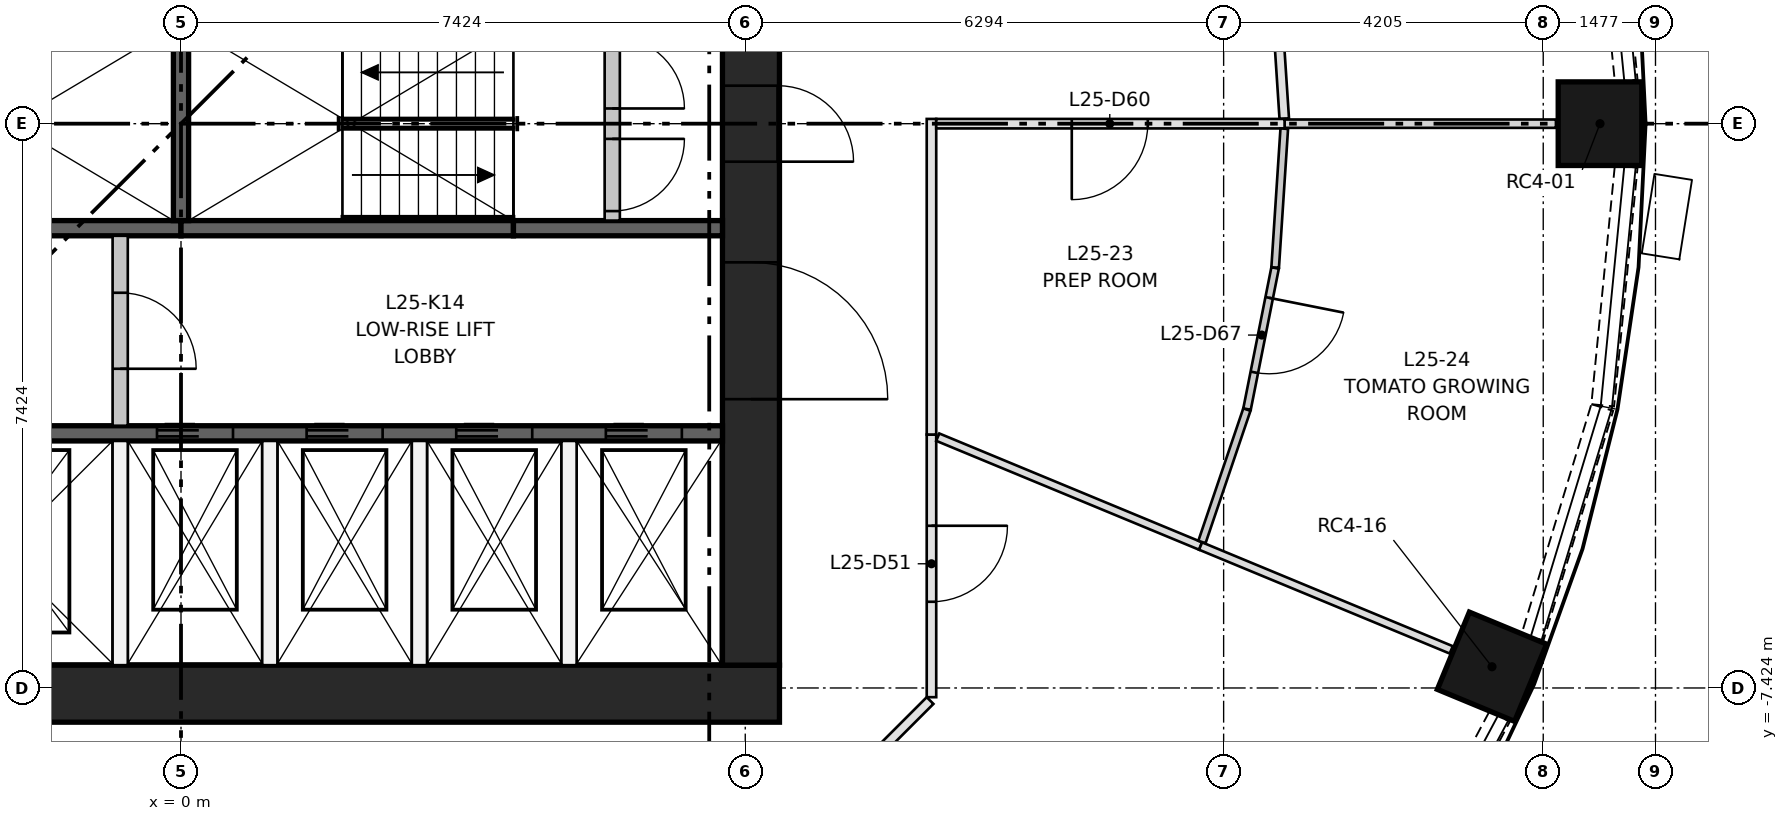
"""IFC4 building model, lengths in metres.
Left out: names, types, materials, properties, quantities, classifications, styles, units other than length and angle.
Written with IfcOpenShell. Run it as: python <this file> out.ifc"""

import sys

from ifc_helpers import new_model, si_unit, direction, frame, frame_2d, origin, origin_2d, place, context, subcontext, project, spatial, rectangle, extrude, element, fill, save


model = new_model("IFC4")
c1 = context("Model", 3, precision=1e-05, world=origin(), true_north=direction((0.0, 1.0)))
c2 = subcontext(c1, "Body", "Model", "MODEL_VIEW")
j1 = project(units=[si_unit("LENGTHUNIT", "METRE"), si_unit("PLANEANGLEUNIT", "RADIAN")], contexts=[c1])
p1 = place(None, origin())
s1 = spatial("IfcSite", under=j1, at=p1, CompositionType="ELEMENT")
p2 = place(p1, origin())
s2 = spatial("IfcBuilding", under=s1, at=p2, CompositionType="ELEMENT")
p3 = place(p2, frame((0.0, 0.0, 98.3)))
s3 = spatial("IfcBuildingStorey", under=s2, at=p3, CompositionType="ELEMENT", Elevation=98.3)
for number, where, z_axis, x_axis in (
    (1, (18.67, 0.0, 0.0), (0.0, 0.0, 1.0), (1.0, 0.0, 0.0)),
    (2, (17.249, -7.145, 0.0), (0.0, 0.0, 1.0), (0.924, -0.383, 0.0)),
):
    element("IfcColumn", number, at=place(p3, frame(where, z_axis=z_axis, x_axis=x_axis)), inside=s3, PredefinedType="COLUMN", context=c2, shape_type="SweptSolid", body=[
        extrude(rectangle(XDim=1.1, YDim=1.1, at=origin_2d()), origin(), (0.0, 0.0, 1.0), 3.65),
    ])
p4 = place(p3, frame((-7.874, -7.499, 0.0), z_axis=(0.0, 0.0, 1.0), x_axis=(1.0, 0.0, 0.0)))
e3 = element("IfcWall", 3, at=p4, inside=s3, PredefinedType="SHEAR", context=c2, shape_type="SweptSolid", body=[
    extrude(rectangle(XDim=15.748, YDim=0.75, at=frame_2d((7.874, 0.0))), origin(), (0.0, 0.0, 1.0), 3.65),
])
p5 = place(p3, frame((7.499, -7.124, 0.0), z_axis=(0.0, 0.0, 1.0), x_axis=(0.0, 1.0, 0.0)))
e4 = element("IfcWall", 4, at=p5, inside=s3, PredefinedType="SHEAR", context=c2, shape_type="SweptSolid", body=[
    extrude(rectangle(XDim=14.248, YDim=0.75, at=frame_2d((7.124, 0.0))), origin(), (0.0, 0.0, 1.0), 3.65),
])
p6 = place(p5, frame((6.624, 0.0, 0.0)))
e5 = element("IfcOpeningElement", 5, at=p6, cuts=e4, PredefinedType="OPENING", context=c2, shape_type="SweptSolid", body=[
    extrude(rectangle(XDim=1.0, YDim=2.1, at=frame_2d((0.5, 1.05))), frame((0.0, 0.385, 0.0), z_axis=(0.0, -1.0, 0.0), x_axis=(1.0, 0.0, 0.0)), (0.0, 0.0, 1.0), 0.77),
])
p7 = place(p5, frame((3.5, 0.0, 0.0)))
e6 = element("IfcOpeningElement", 6, at=p7, cuts=e4, PredefinedType="OPENING", context=c2, shape_type="SweptSolid", body=[
    extrude(rectangle(XDim=1.8, YDim=2.1, at=frame_2d((0.9, 1.05))), frame((0.0, 0.385, 0.0), z_axis=(0.0, -1.0, 0.0), x_axis=(1.0, 0.0, 0.0)), (0.0, 0.0, 1.0), 0.77),
])
p8 = place(p5, frame((8.948, 0.0, 0.0)))
e7 = element("IfcOpeningElement", 7, at=p8, cuts=e4, PredefinedType="OPENING", context=c2, shape_type="SweptSolid", body=[
    extrude(rectangle(XDim=1.8, YDim=2.1, at=frame_2d((0.9, 1.05))), frame((0.0, 0.385, 0.0), z_axis=(0.0, -1.0, 0.0), x_axis=(1.0, 0.0, 0.0)), (0.0, 0.0, 1.0), 0.77),
])
p9 = place(p3, frame((-7.124, -4.074, 0.0), z_axis=(0.0, 0.0, 1.0), x_axis=(1.0, 0.0, 0.0)))
e8 = element("IfcWall", 8, at=p9, inside=s3, PredefinedType="SHEAR", context=c2, shape_type="SweptSolid", body=[
    extrude(rectangle(XDim=14.248, YDim=0.2, at=frame_2d((7.124, 0.0))), origin(), (0.0, 0.0, 1.0), 3.3),
])
p10 = place(p9, frame((1.069, 0.0, 0.0)))
e9 = element("IfcOpeningElement", 9, at=p10, cuts=e8, PredefinedType="OPENING", context=c2, shape_type="SweptSolid", body=[
    extrude(rectangle(XDim=1.1, YDim=2.1, at=frame_2d((0.55, 1.05))), frame((0.0, 0.11, 0.0), z_axis=(0.0, -1.0, 0.0), x_axis=(1.0, 0.0, 0.0)), (0.0, 0.0, 1.0), 0.22),
])
p11 = place(p9, frame((4.206, 0.0, 0.0)))
e10 = element("IfcOpeningElement", 10, at=p11, cuts=e8, PredefinedType="OPENING", context=c2, shape_type="SweptSolid", body=[
    extrude(rectangle(XDim=1.1, YDim=2.1, at=frame_2d((0.55, 1.05))), frame((0.0, 0.11, 0.0), z_axis=(0.0, -1.0, 0.0), x_axis=(1.0, 0.0, 0.0)), (0.0, 0.0, 1.0), 0.22),
])
p12 = place(p9, frame((6.808, 0.0, 0.0)))
e11 = element("IfcOpeningElement", 11, at=p12, cuts=e8, PredefinedType="OPENING", context=c2, shape_type="SweptSolid", body=[
    extrude(rectangle(XDim=1.0, YDim=2.1, at=frame_2d((0.5, 1.05))), frame((0.0, 0.11, 0.0), z_axis=(0.0, -1.0, 0.0), x_axis=(1.0, 0.0, 0.0)), (0.0, 0.0, 1.0), 0.22),
])
p13 = place(p9, frame((8.777, 0.0, 0.0)))
e12 = element("IfcOpeningElement", 12, at=p13, cuts=e8, PredefinedType="OPENING", context=c2, shape_type="SweptSolid", body=[
    extrude(rectangle(XDim=1.0, YDim=2.1, at=frame_2d((0.5, 1.05))), frame((0.0, 0.11, 0.0), z_axis=(0.0, -1.0, 0.0), x_axis=(1.0, 0.0, 0.0)), (0.0, 0.0, 1.0), 0.22),
])
p14 = place(p9, frame((10.745, 0.0, 0.0)))
e13 = element("IfcOpeningElement", 13, at=p14, cuts=e8, PredefinedType="OPENING", context=c2, shape_type="SweptSolid", body=[
    extrude(rectangle(XDim=1.0, YDim=2.1, at=frame_2d((0.5, 1.05))), frame((0.0, 0.11, 0.0), z_axis=(0.0, -1.0, 0.0), x_axis=(1.0, 0.0, 0.0)), (0.0, 0.0, 1.0), 0.22),
])
p15 = place(p9, frame((12.714, 0.0, 0.0)))
e14 = element("IfcOpeningElement", 14, at=p15, cuts=e8, PredefinedType="OPENING", context=c2, shape_type="SweptSolid", body=[
    extrude(rectangle(XDim=1.0, YDim=2.1, at=frame_2d((0.5, 1.05))), frame((0.0, 0.11, 0.0), z_axis=(0.0, -1.0, 0.0), x_axis=(1.0, 0.0, 0.0)), (0.0, 0.0, 1.0), 0.22),
])
for number, where, z_axis, x_axis in (
    (15, (-4.374, -1.375, 0.0), (0.0, 0.0, 1.0), (1.0, 0.0, 0.0)),
    (16, (0.0, -1.375, 0.0), (0.0, 0.0, 1.0), (1.0, 0.0, 0.0)),
):
    element("IfcWall", number, at=place(p3, frame(where, z_axis=z_axis, x_axis=x_axis)), inside=s3, PredefinedType="SHEAR", context=c2, shape_type="SweptSolid", body=[
        extrude(rectangle(XDim=4.374, YDim=0.2, at=frame_2d((2.187, 0.0))), origin(), (0.0, 0.0, 1.0), 3.3),
    ])
p16 = place(p3, frame((4.374, -1.375, 0.0), z_axis=(0.0, 0.0, 1.0), x_axis=(1.0, 0.0, 0.0)))
e17 = element("IfcWall", 17, at=p16, inside=s3, PredefinedType="SHEAR", context=c2, shape_type="SweptSolid", body=[
    extrude(rectangle(XDim=2.75, YDim=0.2, at=frame_2d((1.375, 0.0))), origin(), (0.0, 0.0, 1.0), 3.3),
])
p17 = place(p3, frame((0.0, -1.275, 0.0), z_axis=(0.0, 0.0, 1.0), x_axis=(0.0, 1.0, 0.0)))
e18 = element("IfcWall", 18, at=p17, inside=s3, PredefinedType="SHEAR", context=c2, shape_type="SweptSolid", body=[
    extrude(rectangle(XDim=2.55, YDim=0.2, at=frame_2d((1.275, 0.0))), origin(), (0.0, 0.0, 1.0), 3.3),
])
p18 = place(p3, frame((-0.8, -7.124, 0.0), z_axis=(0.0, 0.0, 1.0), x_axis=(0.0, 1.0, 0.0)))
e19 = element("IfcWall", 19, at=p18, inside=s3, PredefinedType="PARTITIONING", context=c2, shape_type="SweptSolid", body=[
    extrude(rectangle(XDim=2.95, YDim=0.2, at=frame_2d((1.475, 0.0))), origin(), (0.0, 0.0, 1.0), 3.3),
])
p19 = place(p3, frame((-0.8, -3.974, 0.0), z_axis=(0.0, 0.0, 1.0), x_axis=(0.0, 1.0, 0.0)))
e20 = element("IfcWall", 20, at=p19, inside=s3, PredefinedType="PARTITIONING", context=c2, shape_type="SweptSolid", body=[
    extrude(rectangle(XDim=2.499, YDim=0.2, at=frame_2d((1.25, 0.0))), origin(), (0.0, 0.0, 1.0), 3.3),
])
p20 = place(p19, frame((0.75, 0.0, 0.0)))
e21 = element("IfcOpeningElement", 21, at=p20, cuts=e20, PredefinedType="OPENING", context=c2, shape_type="SweptSolid", body=[
    extrude(rectangle(XDim=1.0, YDim=2.1, at=frame_2d((0.5, 1.05))), frame((0.0, 0.11, 0.0), z_axis=(0.0, -1.0, 0.0), x_axis=(1.0, 0.0, 0.0)), (0.0, 0.0, 1.0), 0.22),
])
for number, where, z_axis, x_axis in (
    (22, (1.168, -7.124, 0.0), (0.0, 0.0, 1.0), (0.0, 1.0, 0.0)),
    (23, (3.137, -7.124, 0.0), (0.0, 0.0, 1.0), (0.0, 1.0, 0.0)),
    (24, (5.105, -7.124, 0.0), (0.0, 0.0, 1.0), (0.0, 1.0, 0.0)),
):
    element("IfcWall", number, at=place(p3, frame(where, z_axis=z_axis, x_axis=x_axis)), inside=s3, PredefinedType="PARTITIONING", context=c2, shape_type="SweptSolid", body=[
        extrude(rectangle(XDim=2.95, YDim=0.2, at=frame_2d((1.475, 0.0))), origin(), (0.0, 0.0, 1.0), 3.3),
    ])
p21 = place(p3, frame((5.674, -1.275, 0.0), z_axis=(0.0, 0.0, 1.0), x_axis=(0.0, 1.0, 0.0)))
e25 = element("IfcWall", 25, at=p21, inside=s3, PredefinedType="PARTITIONING", context=c2, shape_type="SweptSolid", body=[
    extrude(rectangle(XDim=2.55, YDim=0.2, at=frame_2d((1.275, 0.0))), origin(), (0.0, 0.0, 1.0), 3.3),
])
p22 = place(p21, frame((0.125, 0.0, 0.0)))
e26 = element("IfcOpeningElement", 26, at=p22, cuts=e25, PredefinedType="OPENING", context=c2, shape_type="SweptSolid", body=[
    extrude(rectangle(XDim=0.95, YDim=2.1, at=frame_2d((0.475, 1.05))), frame((0.0, 0.11, 0.0), z_axis=(0.0, -1.0, 0.0), x_axis=(1.0, 0.0, 0.0)), (0.0, 0.0, 1.0), 0.22),
])
p23 = place(p21, frame((1.475, 0.0, 0.0)))
e27 = element("IfcOpeningElement", 27, at=p23, cuts=e25, PredefinedType="OPENING", context=c2, shape_type="SweptSolid", body=[
    extrude(rectangle(XDim=0.95, YDim=2.1, at=frame_2d((0.475, 1.05))), frame((0.0, 0.11, 0.0), z_axis=(0.0, -1.0, 0.0), x_axis=(1.0, 0.0, 0.0)), (0.0, 0.0, 1.0), 0.22),
])
p24 = place(p3, frame((19.014, 0.564, 0.0), z_axis=(0.0, 0.0, 1.0), x_axis=(-0.097849336863, 0.995201239587, 0.0)))
e28 = element("IfcWall", 28, at=p24, inside=s3, PredefinedType="SOLIDWALL", context=c2, shape_type="SweptSolid", body=[
    extrude(rectangle(XDim=3.156, YDim=0.3, at=frame_2d((1.578, 0.0))), origin(), (0.0, 0.0, 1.0), 0.9),
])
p25 = place(p3, frame((15.863, -10.582, 0.0), z_axis=(0.0, 0.0, 1.0), x_axis=(0.471238306932, 0.882005928597, 0.0)))
e29 = element("IfcWall", 29, at=p25, inside=s3, PredefinedType="SOLIDWALL", context=c2, shape_type="SweptSolid", body=[
    extrude(rectangle(XDim=3.157, YDim=0.3, at=frame_2d((1.579, 0.0))), origin(), (0.0, 0.0, 1.0), 0.9),
])
p26 = place(p3, frame((17.782, -6.756, 0.0), z_axis=(0.0, 0.0, 1.0), x_axis=(0.290503096001, 0.956874051907, 0.0)))
e30 = element("IfcWall", 30, at=p26, inside=s3, PredefinedType="SOLIDWALL", context=c2, shape_type="SweptSolid", body=[
    extrude(rectangle(XDim=3.157, YDim=0.3, at=frame_2d((1.579, 0.0))), origin(), (0.0, 0.0, 1.0), 0.9),
])
p27 = place(p3, frame((18.706, -3.705, 0.0), z_axis=(0.0, 0.0, 1.0), x_axis=(0.097849336863, 0.995201239587, 0.0)))
e31 = element("IfcWall", 31, at=p27, inside=s3, PredefinedType="SOLIDWALL", context=c2, shape_type="SweptSolid", body=[
    extrude(rectangle(XDim=3.156, YDim=0.3, at=frame_2d((1.578, 0.0))), origin(), (0.0, 0.0, 1.0), 0.9),
])
p28 = place(p3, frame((9.856, -7.589, 0.0), z_axis=(0.0, 0.0, 1.0), x_axis=(-0.70718294931, -0.707030604857, 0.0)))
e32 = element("IfcWall", 32, at=p28, inside=s3, PredefinedType="PARTITIONING", context=c2, shape_type="SweptSolid", body=[
    extrude(rectangle(XDim=1.603, YDim=0.125, at=frame_2d((0.801, 0.0))), origin(), (0.0, 0.0, 1.0), 3.3),
])
p29 = place(p3, frame((9.874, -4.09, 0.0), z_axis=(0.0, 0.0, 1.0), x_axis=(0.0, -1.0, 0.0)))
e33 = element("IfcWall", 33, at=p29, inside=s3, PredefinedType="PARTITIONING", context=c2, shape_type="SweptSolid", body=[
    extrude(rectangle(XDim=3.455, YDim=0.125, at=frame_2d((1.728, 0.0))), origin(), (0.0, 0.0, 1.0), 3.3),
])
p30 = place(p29, frame((1.2, 0.0, 0.0)))
e34 = element("IfcOpeningElement", 34, at=p30, cuts=e33, PredefinedType="OPENING", context=c2, shape_type="SweptSolid", body=[
    extrude(rectangle(XDim=1.0, YDim=2.1, at=frame_2d((0.5, 1.05))), frame((0.0, 0.073, 0.0), z_axis=(0.0, -1.0, 0.0), x_axis=(1.0, 0.0, 0.0)), (0.0, 0.0, 1.0), 0.145),
])
p31 = place(p3, frame((9.874, 0.062, 0.0), z_axis=(0.0, 0.0, 1.0), x_axis=(0.0, -1.0, 0.0)))
e35 = element("IfcWall", 35, at=p31, inside=s3, PredefinedType="PARTITIONING", context=c2, shape_type="SweptSolid", body=[
    extrude(rectangle(XDim=4.152, YDim=0.125, at=frame_2d((2.076, 0.0))), origin(), (0.0, 0.0, 1.0), 3.3),
])
p32 = place(p3, frame((14.516, 0.067, 0.0), z_axis=(0.0, 0.0, 1.0), x_axis=(-0.065428883326, 0.997857234892, 0.0)))
e36 = element("IfcWall", 36, at=p32, inside=s3, PredefinedType="PARTITIONING", context=c2, shape_type="SweptSolid", body=[
    extrude(rectangle(XDim=1.828, YDim=0.125, at=frame_2d((0.914, 0.0))), origin(), (0.0, 0.0, 1.0), 3.3),
])
p33 = place(p3, frame((18.09, 0.0, 0.0), z_axis=(0.0, 0.0, 1.0), x_axis=(-1.0, 0.0, 0.0)))
e37 = element("IfcWall", 37, at=p33, inside=s3, PredefinedType="PARTITIONING", context=c2, shape_type="SweptSolid", body=[
    extrude(rectangle(XDim=3.57, YDim=0.11, at=frame_2d((1.785, 0.0))), origin(), (0.0, 0.0, 1.0), 3.3),
])
p34 = place(p3, frame((14.52, 0.0, 0.0), z_axis=(0.0, 0.0, 1.0), x_axis=(-1.0, 0.0, 0.0)))
e38 = element("IfcWall", 38, at=p34, inside=s3, PredefinedType="PARTITIONING", context=c2, shape_type="SweptSolid", body=[
    extrude(rectangle(XDim=4.583, YDim=0.125, at=frame_2d((2.292, 0.0))), origin(), (0.0, 0.0, 1.0), 3.3),
])
p35 = place(p34, frame((1.8, 0.0, 0.0)))
e39 = element("IfcOpeningElement", 39, at=p35, cuts=e38, PredefinedType="OPENING", context=c2, shape_type="SweptSolid", body=[
    extrude(rectangle(XDim=1.0, YDim=2.1, at=frame_2d((0.5, 1.05))), frame((0.0, 0.073, 0.0), z_axis=(0.0, -1.0, 0.0), x_axis=(1.0, 0.0, 0.0)), (0.0, 0.0, 1.0), 0.145),
])
p36 = place(p3, frame((9.957, -4.124, 0.0), z_axis=(0.0, 0.0, 1.0), x_axis=(0.923887259949, -0.382664776147, 0.0)))
e40 = element("IfcWall", 40, at=p36, inside=s3, PredefinedType="PARTITIONING", context=c2, shape_type="SweptSolid", body=[
    extrude(rectangle(XDim=3.743, YDim=0.105, at=frame_2d((1.872, 0.0))), origin(), (0.0, 0.0, 1.0), 3.3),
])
p37 = place(p3, frame((13.415, -5.556, 0.0), z_axis=(0.0, 0.0, 1.0), x_axis=(0.923870126847, -0.382706138858, 0.0)))
e41 = element("IfcWall", 41, at=p37, inside=s3, PredefinedType="PARTITIONING", context=c2, shape_type="SweptSolid", body=[
    extrude(rectangle(XDim=3.57, YDim=0.105, at=frame_2d((1.785, 0.0))), origin(), (0.0, 0.0, 1.0), 3.3),
])
p38 = place(p3, frame((14.024, -3.761, 0.0), z_axis=(0.0, 0.0, 1.0), x_axis=(-0.32147693474, -0.946917409508, 0.0)))
e42 = element("IfcWall", 42, at=p38, inside=s3, PredefinedType="PARTITIONING", context=c2, shape_type="SweptSolid", body=[
    extrude(rectangle(XDim=1.84, YDim=0.1, at=frame_2d((0.92, 0.0))), origin(), (0.0, 0.0, 1.0), 3.3),
])
p39 = place(p3, frame((14.395, -1.898, 0.0), z_axis=(0.0, 0.0, 1.0), x_axis=(-0.195148680089, -0.980773670456, 0.0)))
e43 = element("IfcWall", 43, at=p39, inside=s3, PredefinedType="PARTITIONING", context=c2, shape_type="SweptSolid", body=[
    extrude(rectangle(XDim=1.893, YDim=0.1, at=frame_2d((0.946, 0.0))), origin(), (0.0, 0.0, 1.0), 3.3),
])
p40 = place(p39, frame((0.4, 0.0, 0.0)))
e44 = element("IfcOpeningElement", 44, at=p40, cuts=e43, PredefinedType="OPENING", context=c2, shape_type="SweptSolid", body=[
    extrude(rectangle(XDim=1.0, YDim=2.1, at=frame_2d((0.5, 1.05))), frame((0.0, 0.06, 0.0), z_axis=(0.0, -1.0, 0.0), x_axis=(1.0, 0.0, 0.0)), (0.0, 0.0, 1.0), 0.12),
])
p41 = place(p3, frame((14.516, -0.066, 0.0), z_axis=(0.0, 0.0, 1.0), x_axis=(-0.065376617685, -0.997860660543, 0.0)))
e45 = element("IfcWall", 45, at=p41, inside=s3, PredefinedType="PARTITIONING", context=c2, shape_type="SweptSolid", body=[
    extrude(rectangle(XDim=1.83, YDim=0.1, at=frame_2d((0.915, 0.0))), origin(), (0.0, 0.0, 1.0), 3.3),
])
p42 = place(p12, origin())
e46 = element("IfcDoor", 46, at=p42, inside=s3, OperationType="DOUBLE_DOOR_SLIDING", PredefinedType="DOOR", context=c2, shape_type="SweptSolid", body=[
    extrude(rectangle(XDim=1.0, YDim=2.1, at=frame_2d((0.5, 1.05))), frame((0.0, 0.025, 0.0), z_axis=(0.0, -1.0, 0.0), x_axis=(1.0, 0.0, 0.0)), (0.0, 0.0, 1.0), 0.05),
])
fill(e11, e46)
p43 = place(p13, origin())
e47 = element("IfcDoor", 47, at=p43, inside=s3, OperationType="DOUBLE_DOOR_SLIDING", PredefinedType="DOOR", context=c2, shape_type="SweptSolid", body=[
    extrude(rectangle(XDim=1.0, YDim=2.1, at=frame_2d((0.5, 1.05))), frame((0.0, 0.025, 0.0), z_axis=(0.0, -1.0, 0.0), x_axis=(1.0, 0.0, 0.0)), (0.0, 0.0, 1.0), 0.05),
])
fill(e12, e47)
p44 = place(p14, origin())
e48 = element("IfcDoor", 48, at=p44, inside=s3, OperationType="DOUBLE_DOOR_SLIDING", PredefinedType="DOOR", context=c2, shape_type="SweptSolid", body=[
    extrude(rectangle(XDim=1.0, YDim=2.1, at=frame_2d((0.5, 1.05))), frame((0.0, 0.025, 0.0), z_axis=(0.0, -1.0, 0.0), x_axis=(1.0, 0.0, 0.0)), (0.0, 0.0, 1.0), 0.05),
])
fill(e13, e48)
p45 = place(p15, origin())
e49 = element("IfcDoor", 49, at=p45, inside=s3, OperationType="DOUBLE_DOOR_SLIDING", PredefinedType="DOOR", context=c2, shape_type="SweptSolid", body=[
    extrude(rectangle(XDim=1.0, YDim=2.1, at=frame_2d((0.5, 1.05))), frame((0.0, 0.025, 0.0), z_axis=(0.0, -1.0, 0.0), x_axis=(1.0, 0.0, 0.0)), (0.0, 0.0, 1.0), 0.05),
])
fill(e14, e49)
p46 = place(p22, frame((0.95, 0.0, 0.0), z_axis=(0.0, 0.0, 1.0), x_axis=(-1.0, 0.0, 0.0)))
e50 = element("IfcDoor", 50, at=p46, inside=s3, OperationType="SINGLE_SWING_RIGHT", PredefinedType="DOOR", context=c2, shape_type="SweptSolid", body=[
    extrude(rectangle(XDim=0.95, YDim=2.1, at=frame_2d((0.475, 1.05))), frame((0.0, 0.025, 0.0), z_axis=(0.0, -1.0, 0.0), x_axis=(1.0, 0.0, 0.0)), (0.0, 0.0, 1.0), 0.05),
])
fill(e26, e50)
p47 = place(p23, frame((0.95, 0.0, 0.0), z_axis=(0.0, 0.0, 1.0), x_axis=(-1.0, 0.0, 0.0)))
e51 = element("IfcDoor", 51, at=p47, inside=s3, OperationType="SINGLE_SWING_LEFT", PredefinedType="DOOR", context=c2, shape_type="SweptSolid", body=[
    extrude(rectangle(XDim=0.95, YDim=2.1, at=frame_2d((0.475, 1.05))), frame((0.0, 0.025, 0.0), z_axis=(0.0, -1.0, 0.0), x_axis=(1.0, 0.0, 0.0)), (0.0, 0.0, 1.0), 0.05),
])
fill(e27, e51)
p48 = place(p20, frame((1.0, 0.0, 0.0), z_axis=(0.0, 0.0, 1.0), x_axis=(-1.0, 0.0, 0.0)))
e52 = element("IfcDoor", 52, at=p48, inside=s3, OperationType="SINGLE_SWING_LEFT", PredefinedType="DOOR", context=c2, shape_type="SweptSolid", body=[
    extrude(rectangle(XDim=1.0, YDim=2.1, at=frame_2d((0.5, 1.05))), frame((0.0, 0.025, 0.0), z_axis=(0.0, -1.0, 0.0), x_axis=(1.0, 0.0, 0.0)), (0.0, 0.0, 1.0), 0.05),
])
fill(e21, e52)
p49 = place(p6, frame((1.0, 0.0, 0.0), z_axis=(0.0, 0.0, 1.0), x_axis=(-1.0, 0.0, 0.0)))
e53 = element("IfcDoor", 53, at=p49, inside=s3, OperationType="SINGLE_SWING_LEFT", PredefinedType="DOOR", context=c2, shape_type="SweptSolid", body=[
    extrude(rectangle(XDim=1.0, YDim=2.1, at=frame_2d((0.5, 1.05))), frame((0.0, 0.375, 0.0), z_axis=(0.0, -1.0, 0.0), x_axis=(1.0, 0.0, 0.0)), (0.0, 0.0, 1.0), 0.05),
])
fill(e5, e53)
p50 = place(p7, frame((1.8, 0.0, 0.0), z_axis=(0.0, 0.0, 1.0), x_axis=(-1.0, 0.0, 0.0)))
e54 = element("IfcDoor", 54, at=p50, inside=s3, OperationType="DOUBLE_DOOR_SINGLE_SWING", PredefinedType="DOOR", context=c2, shape_type="SweptSolid", body=[
    extrude(rectangle(XDim=1.8, YDim=2.1, at=frame_2d((0.9, 1.05))), frame((0.0, 0.025, 0.0), z_axis=(0.0, -1.0, 0.0), x_axis=(1.0, 0.0, 0.0)), (0.0, 0.0, 1.0), 0.05),
])
fill(e6, e54)
p51 = place(p30, origin())
e55 = element("IfcDoor", 55, at=p51, inside=s3, OperationType="SINGLE_SWING_LEFT", PredefinedType="DOOR", context=c2, shape_type="SweptSolid", body=[
    extrude(rectangle(XDim=1.0, YDim=2.1, at=frame_2d((0.5, 1.05))), frame((0.0, 0.025, 0.0), z_axis=(0.0, -1.0, 0.0), x_axis=(1.0, 0.0, 0.0)), (0.0, 0.0, 1.0), 0.05),
])
fill(e34, e55)
p52 = place(p35, origin())
e56 = element("IfcDoor", 56, at=p52, inside=s3, OperationType="SINGLE_SWING_RIGHT", PredefinedType="DOOR", context=c2, shape_type="SweptSolid", body=[
    extrude(rectangle(XDim=1.0, YDim=2.1, at=frame_2d((0.5, 1.05))), frame((0.0, 0.025, 0.0), z_axis=(0.0, -1.0, 0.0), x_axis=(1.0, 0.0, 0.0)), (0.0, 0.0, 1.0), 0.05),
])
fill(e39, e56)
p53 = place(p40, origin())
e57 = element("IfcDoor", 57, at=p53, inside=s3, OperationType="SINGLE_SWING_LEFT", PredefinedType="DOOR", context=c2, shape_type="SweptSolid", body=[
    extrude(rectangle(XDim=1.0, YDim=2.1, at=frame_2d((0.5, 1.05))), frame((0.0, 0.025, 0.0), z_axis=(0.0, -1.0, 0.0), x_axis=(1.0, 0.0, 0.0)), (0.0, 0.0, 1.0), 0.05),
])
fill(e44, e57)
save(model, sys.argv[1])
